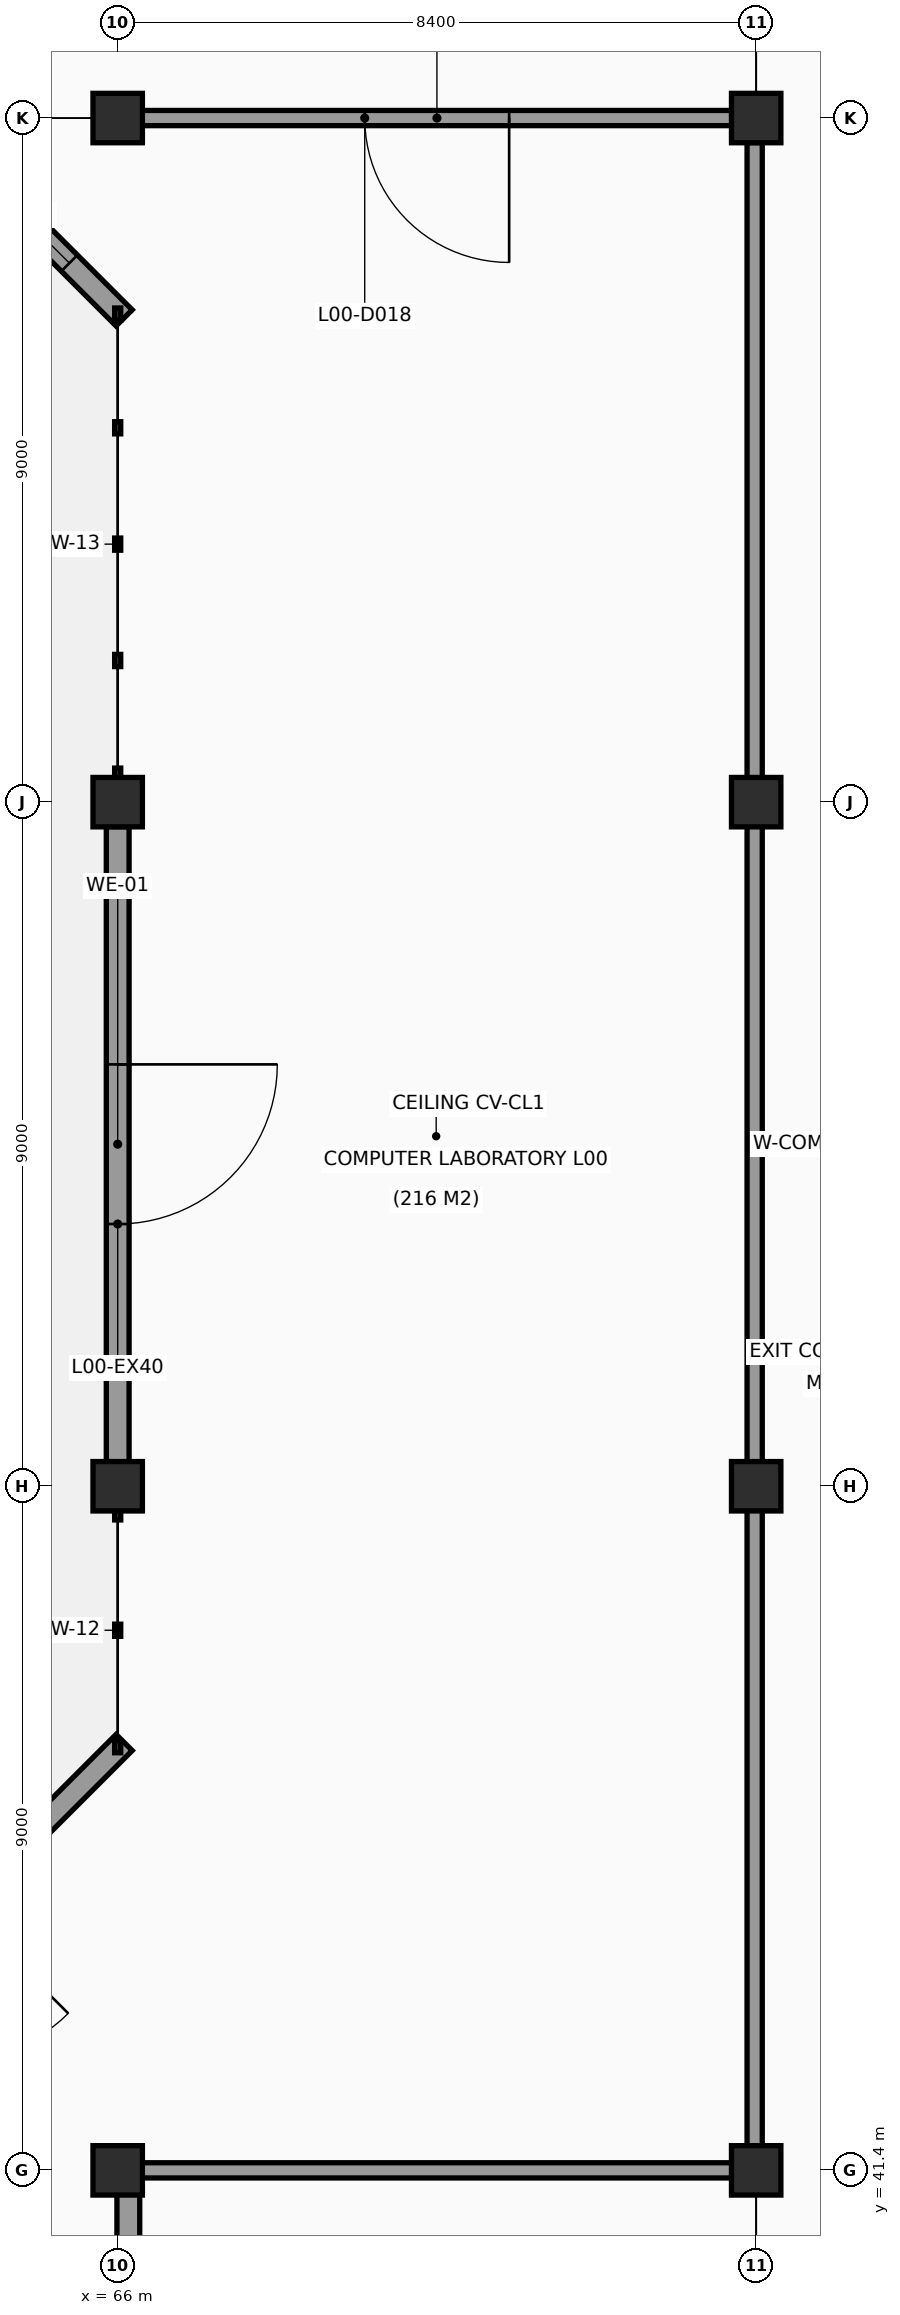
"""IFC4 building model, lengths in metres.
Left out: names, types, materials, properties, quantities, classifications, styles, units other than length and angle.
Written with IfcOpenShell. Run it as: python <this file> out.ifc"""

import sys

from ifc_helpers import new_model, si_unit, direction, frame, frame_2d, origin, origin_2d, place, context, subcontext, project, spatial, rectangle, extrude, element, fill, save


model = new_model("IFC4")
c1 = context("Model", 3, precision=1e-05, world=origin(), true_north=direction((0.0, 1.0)))
c2 = subcontext(c1, "Body", "Model", "MODEL_VIEW")
j1 = project(units=[si_unit("LENGTHUNIT", "METRE"), si_unit("PLANEANGLEUNIT", "RADIAN")], contexts=[c1])
p1 = place(None, origin())
s1 = spatial("IfcSite", under=j1, at=p1, CompositionType="ELEMENT")
p2 = place(p1, origin())
s2 = spatial("IfcBuilding", under=s1, at=p2, CompositionType="ELEMENT")
p3 = place(p2, origin())
s3 = spatial("IfcBuildingStorey", under=s2, at=p3, CompositionType="ELEMENT", Elevation=0.0)
for number, where, z_axis, x_axis in (
    (1, (66.0, 41.4, -0.4), (0.0, 0.0, 1.0), (1.0, 0.0, 0.0)),
    (2, (66.0, 50.4, -0.4), (0.0, 0.0, 1.0), (1.0, 0.0, 0.0)),
    (3, (66.0, 59.4, -0.4), (0.0, 0.0, 1.0), (1.0, 0.0, 0.0)),
    (4, (66.0, 68.4, -0.4), (0.0, 0.0, 1.0), (1.0, 0.0, 0.0)),
    (5, (74.4, 41.4, -0.4), (0.0, 0.0, 1.0), (1.0, 0.0, 0.0)),
    (6, (74.4, 50.4, -0.4), (0.0, 0.0, 1.0), (1.0, 0.0, 0.0)),
    (7, (74.4, 59.4, -0.4), (0.0, 0.0, 1.0), (1.0, 0.0, 0.0)),
    (8, (74.4, 68.4, -0.4), (0.0, 0.0, 1.0), (1.0, 0.0, 0.0)),
):
    element("IfcColumn", number, at=place(p3, frame(where, z_axis=z_axis, x_axis=x_axis)), inside=s3, PredefinedType="COLUMN", context=c2, shape_type="SweptSolid", body=[
        extrude(rectangle(XDim=0.65, YDim=0.65, at=origin_2d()), origin(), (0.0, 0.0, 1.0), 4.6),
    ])
p4 = place(p3, frame((60.371, 41.315, 0.0), z_axis=(0.0, 0.0, 1.0), x_axis=(0.707121887885, 0.707091674165, 0.0)))
e9 = element("IfcWall", 9, at=p4, inside=s3, PredefinedType="SOLIDWALL", context=c2, shape_type="SweptSolid", body=[
    extrude(rectangle(XDim=8.081, YDim=0.3, at=frame_2d((4.04, 0.0))), origin(), (0.0, 0.0, 1.0), 3.12),
])
p5 = place(p4, frame((3.04, 0.0, 0.0)))
e10 = element("IfcOpeningElement", 10, at=p5, cuts=e9, PredefinedType="OPENING", context=c2, shape_type="SweptSolid", body=[
    extrude(rectangle(XDim=2.0, YDim=2.25, at=frame_2d((1.0, 1.125))), frame((0.0, 0.16, 0.0), z_axis=(0.0, -1.0, 0.0), x_axis=(1.0, 0.0, 0.0)), (0.0, 0.0, 1.0), 0.32),
])
p6 = place(p3, frame((66.0, 50.723, 0.0), z_axis=(0.0, 0.0, 1.0), x_axis=(0.0, 1.0, 0.0)))
e11 = element("IfcWall", 11, at=p6, inside=s3, PredefinedType="SOLIDWALL", context=c2, shape_type="SweptSolid", body=[
    extrude(rectangle(XDim=8.354, YDim=0.3, at=frame_2d((4.177, 0.0))), origin(), (0.0, 0.0, 1.0), 3.22),
])
p7 = place(p6, frame((3.127, 0.0, 0.0)))
e12 = element("IfcOpeningElement", 12, at=p7, cuts=e11, PredefinedType="OPENING", context=c2, shape_type="SweptSolid", body=[
    extrude(rectangle(XDim=2.1, YDim=2.3, at=frame_2d((1.05, 1.15))), frame((0.0, 0.16, 0.0), z_axis=(0.0, -1.0, 0.0), x_axis=(1.0, 0.0, 0.0)), (0.0, 0.0, 1.0), 0.32),
])
p8 = place(p3, frame((66.085, 65.771, 0.0), z_axis=(0.0, 0.0, 1.0), x_axis=(-0.707106781187, 0.707106781187, 0.0)))
e13 = element("IfcWall", 13, at=p8, inside=s3, PredefinedType="SOLIDWALL", context=c2, shape_type="SweptSolid", body=[
    extrude(rectangle(XDim=3.838, YDim=0.3, at=frame_2d((1.919, 0.0))), origin(), (0.0, 0.0, 1.0), 3.22),
])
p9 = place(p8, frame((1.019, 0.0, 0.95)))
e14 = element("IfcOpeningElement", 14, at=p9, cuts=e13, PredefinedType="OPENING", context=c2, shape_type="SweptSolid", body=[
    extrude(rectangle(XDim=1.8, YDim=1.5, at=frame_2d((0.9, 0.75))), frame((0.0, 0.16, 0.0), z_axis=(0.0, -1.0, 0.0), x_axis=(1.0, 0.0, 0.0)), (0.0, 0.0, 1.0), 0.32),
])
p10 = place(p3, frame((66.14, 41.1, -0.4), z_axis=(0.0, 0.0, 1.0), x_axis=(0.0, -1.0, 0.0)))
e15 = element("IfcWall", 15, at=p10, inside=s3, PredefinedType="SHEAR", context=c2, shape_type="SweptSolid", body=[
    extrude(rectangle(XDim=4.22, YDim=0.3, at=frame_2d((2.11, 0.0))), origin(), (0.0, 0.0, 1.0), 4.32),
])
p11 = place(p10, frame((1.385, 0.0, 0.4)))
e16 = element("IfcOpeningElement", 16, at=p11, cuts=e15, PredefinedType="OPENING", context=c2, shape_type="SweptSolid", body=[
    extrude(rectangle(XDim=2.2, YDim=2.35, at=frame_2d((1.1, 1.175))), frame((0.0, 0.16, 0.0), z_axis=(0.0, -1.0, 0.0), x_axis=(1.0, 0.0, 0.0)), (0.0, 0.0, 1.0), 0.32),
])
p12 = place(p3, frame((66.323, 68.4, 0.0), z_axis=(0.0, 0.0, 1.0), x_axis=(1.0, 0.0, 0.0)))
e17 = element("IfcWall", 17, at=p12, inside=s3, PredefinedType="PARTITIONING", context=c2, shape_type="SweptSolid", body=[
    extrude(rectangle(XDim=7.754, YDim=0.2, at=frame_2d((3.877, 0.0))), origin(), (0.0, 0.0, 1.0), 3.17),
])
p13 = place(p12, frame((2.927, 0.0, 0.0)))
e18 = element("IfcOpeningElement", 18, at=p13, cuts=e17, PredefinedType="OPENING", context=c2, shape_type="SweptSolid", body=[
    extrude(rectangle(XDim=1.9, YDim=2.3, at=frame_2d((0.95, 1.15))), frame((0.0, 0.11, 0.0), z_axis=(0.0, -1.0, 0.0), x_axis=(1.0, 0.0, 0.0)), (0.0, 0.0, 1.0), 0.22),
])
p14 = place(p3, frame((74.38, 68.077, 0.0), z_axis=(0.0, 0.0, 1.0), x_axis=(0.0, -1.0, 0.0)))
e19 = element("IfcWall", 19, at=p14, inside=s3, PredefinedType="PARTITIONING", context=c2, shape_type="SweptSolid", body=[
    extrude(rectangle(XDim=26.354, YDim=0.2, at=frame_2d((13.177, 0.0))), origin(), (0.0, 0.0, 1.0), 3.56),
])
p15 = place(p3, frame((74.077, 41.4, 0.0), z_axis=(0.0, 0.0, 1.0), x_axis=(-1.0, 0.0, 0.0)))
e20 = element("IfcWall", 20, at=p15, inside=s3, PredefinedType="PARTITIONING", context=c2, shape_type="SweptSolid", body=[
    extrude(rectangle(XDim=7.754, YDim=0.2, at=frame_2d((3.877, 0.0))), origin(), (0.0, 0.0, 1.0), 3.12),
])
p16 = place(p7, origin())
e21 = element("IfcDoor", 21, at=p16, inside=s3, OperationType="DOUBLE_DOOR_SINGLE_SWING", PredefinedType="DOOR", context=c2, shape_type="SweptSolid", body=[
    extrude(rectangle(XDim=2.1, YDim=2.3, at=frame_2d((1.05, 1.15))), frame((0.0, 0.025, 0.0), z_axis=(0.0, -1.0, 0.0), x_axis=(1.0, 0.0, 0.0)), (0.0, 0.0, 1.0), 0.05),
])
fill(e12, e21)
p17 = place(p9, origin())
e22 = element("IfcWindow", 22, at=p17, inside=s3, PartitioningType="SINGLE_PANEL", PredefinedType="WINDOW", context=c2, shape_type="SweptSolid", body=[
    extrude(rectangle(XDim=1.8, YDim=1.5, at=frame_2d((0.9, 0.75))), frame((0.0, 0.03, 0.0), z_axis=(0.0, -1.0, 0.0), x_axis=(1.0, 0.0, 0.0)), (0.0, 0.0, 1.0), 0.06),
])
fill(e14, e22)
p18 = place(p13, origin())
e23 = element("IfcDoor", 23, at=p18, inside=s3, OperationType="DOUBLE_DOOR_SINGLE_SWING", PredefinedType="DOOR", context=c2, shape_type="SweptSolid", body=[
    extrude(rectangle(XDim=1.9, YDim=2.3, at=frame_2d((0.95, 1.15))), frame((0.0, 0.025, 0.0), z_axis=(0.0, -1.0, 0.0), x_axis=(1.0, 0.0, 0.0)), (0.0, 0.0, 1.0), 0.05),
])
fill(e18, e23)
save(model, sys.argv[1])
